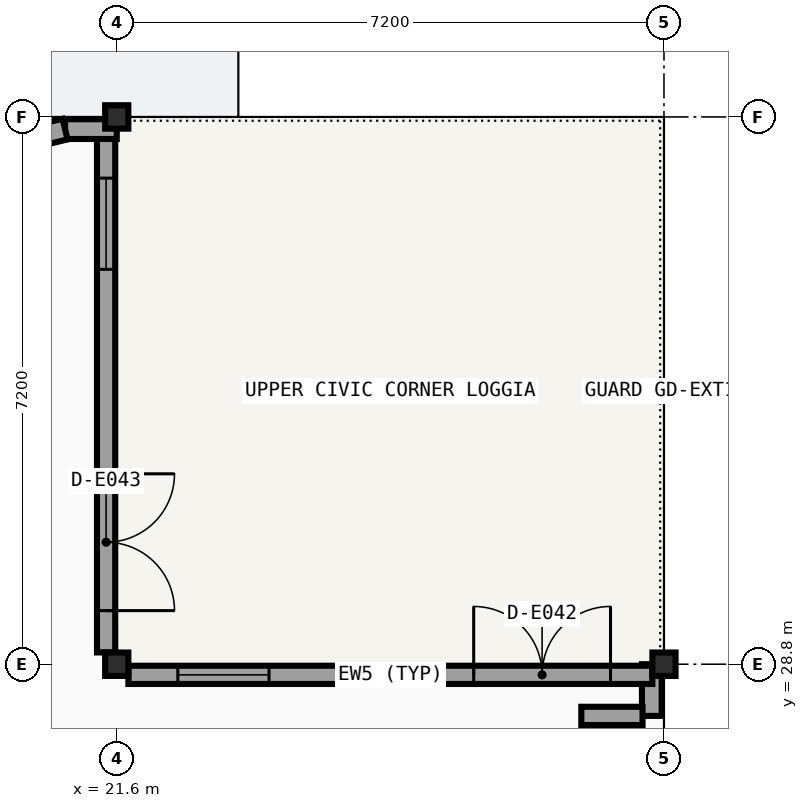
"""IFC4 building model, lengths in metres.
Left out: names, types, materials, properties, quantities, classifications, styles, units other than length and angle.
Written with IfcOpenShell. Run it as: python <this file> out.ifc"""

import sys

from ifc_helpers import new_model, si_unit, direction, frame, frame_2d, origin, origin_2d, place, context, subcontext, project, spatial, rectangle, i_section, extrude, element, fill, save


model = new_model("IFC4")
c1 = context("Model", 3, precision=1e-05, world=origin(), true_north=direction((0.0, 1.0)))
c2 = subcontext(c1, "Body", "Model", "MODEL_VIEW")
j1 = project(units=[si_unit("LENGTHUNIT", "METRE"), si_unit("PLANEANGLEUNIT", "RADIAN")], contexts=[c1])
p1 = place(None, origin())
s1 = spatial("IfcSite", under=j1, at=p1, CompositionType="ELEMENT")
p2 = place(p1, origin())
s2 = spatial("IfcBuilding", under=s1, at=p2, CompositionType="ELEMENT")
p3 = place(p2, frame((0.0, 0.0, 31.05)))
s3 = spatial("IfcBuildingStorey", under=s2, at=p3, CompositionType="ELEMENT", Elevation=31.05)
for number, where, z_axis, x_axis in (
    (1, (21.6, 28.8, 0.0), (0.0, 0.0, 1.0), (1.0, 0.0, 0.0)),
    (2, (21.6, 36.0, 0.0), (0.0, 0.0, 1.0), (1.0, 0.0, 0.0)),
    (3, (28.8, 28.8, 0.0), (0.0, 0.0, 1.0), (1.0, 0.0, 0.0)),
):
    element("IfcColumn", number, at=place(p3, frame(where, z_axis=z_axis, x_axis=x_axis)), inside=s3, PredefinedType="COLUMN", context=c2, shape_type="SweptSolid", body=[
        extrude(i_section(OverallWidth=0.305, OverallDepth=0.308, WebThickness=0.01, FlangeThickness=0.015, FilletRadius=0.015, at=origin_2d()), origin(), (0.0, 0.0, 1.0), 4.2),
    ])
p4 = place(p3, frame((28.64, 28.12, 0.0), z_axis=(0.0, 0.0, 1.0), x_axis=(0.0, 1.0, 0.0)))
e4 = element("IfcWall", 4, at=p4, inside=s3, PredefinedType="SOLIDWALL", context=c2, shape_type="SweptSolid", body=[
    extrude(rectangle(XDim=0.68, YDim=0.26, at=frame_2d((0.34, 0.0))), origin(), (0.0, 0.0, 1.0), 3.95),
])
p5 = place(p3, frame((28.64, 24.86, 0.0), z_axis=(0.0, 0.0, 1.0), x_axis=(-0.233460824675, 0.972366208453, 0.0)))
e5 = element("IfcWall", 5, at=p5, inside=s3, PredefinedType="SOLIDWALL", context=c2, shape_type="SweptSolid", body=[
    extrude(rectangle(XDim=3.258, YDim=0.28, at=frame_2d((1.629, 0.0))), origin(), (0.0, 0.0, 1.0), 3.95),
])
p6 = place(p5, frame((0.829, 0.0, 0.8)))
e6 = element("IfcOpeningElement", 6, at=p6, cuts=e5, PredefinedType="OPENING", context=c2, shape_type="SweptSolid", body=[
    extrude(rectangle(XDim=1.6, YDim=1.75, at=frame_2d((0.8, 0.875))), frame((0.0, 0.15, 0.0), z_axis=(0.0, -1.0, 0.0), x_axis=(1.0, 0.0, 0.0)), (0.0, 0.0, 1.0), 0.3),
])
p7 = place(p3, frame((27.712, 28.12, 0.0), z_axis=(0.0, 0.0, 1.0), x_axis=(1.0, 0.0, 0.0)))
e7 = element("IfcWall", 7, at=p7, inside=s3, PredefinedType="SOLIDWALL", context=c2, shape_type="SweptSolid", body=[
    extrude(rectangle(XDim=0.806, YDim=0.24, at=frame_2d((0.403, 0.0))), origin(), (0.0, 0.0, 1.0), 3.95),
])
p8 = place(p3, frame((28.646, 28.66, 0.0), z_axis=(0.0, 0.0, 1.0), x_axis=(-1.0, 0.0, 0.0)))
e8 = element("IfcWall", 8, at=p8, inside=s3, PredefinedType="SOLIDWALL", context=c2, shape_type="SweptSolid", body=[
    extrude(rectangle(XDim=6.893, YDim=0.24, at=frame_2d((3.447, 0.0))), origin(), (0.0, 0.0, 1.0), 3.95),
])
p9 = place(p8, frame((0.55, 0.0, 0.0)))
e9 = element("IfcOpeningElement", 9, at=p9, cuts=e8, PredefinedType="OPENING", context=c2, shape_type="SweptSolid", body=[
    extrude(rectangle(XDim=1.8, YDim=2.15, at=frame_2d((0.9, 1.075))), frame((0.0, 0.13, 0.0), z_axis=(0.0, -1.0, 0.0), x_axis=(1.0, 0.0, 0.0)), (0.0, 0.0, 1.0), 0.26),
])
p10 = place(p8, frame((5.043, 0.0, 0.85)))
e10 = element("IfcOpeningElement", 10, at=p10, cuts=e8, PredefinedType="OPENING", context=c2, shape_type="SweptSolid", body=[
    extrude(rectangle(XDim=1.2, YDim=1.95, at=frame_2d((0.6, 0.975))), frame((0.0, 0.13, 0.0), z_axis=(0.0, -1.0, 0.0), x_axis=(1.0, 0.0, 0.0)), (0.0, 0.0, 1.0), 0.26),
])
p11 = place(p3, frame((21.46, 28.955, 0.0), z_axis=(0.0, 0.0, 1.0), x_axis=(0.0, 1.0, 0.0)))
e11 = element("IfcWall", 11, at=p11, inside=s3, PredefinedType="SOLIDWALL", context=c2, shape_type="SweptSolid", body=[
    extrude(rectangle(XDim=6.89, YDim=0.24, at=frame_2d((3.445, 0.0))), origin(), (0.0, 0.0, 1.0), 3.95),
])
p12 = place(p11, frame((0.55, 0.0, 0.0)))
e12 = element("IfcOpeningElement", 12, at=p12, cuts=e11, PredefinedType="OPENING", context=c2, shape_type="SweptSolid", body=[
    extrude(rectangle(XDim=1.8, YDim=2.15, at=frame_2d((0.9, 1.075))), frame((0.0, 0.13, 0.0), z_axis=(0.0, -1.0, 0.0), x_axis=(1.0, 0.0, 0.0)), (0.0, 0.0, 1.0), 0.26),
])
p13 = place(p11, frame((5.04, 0.0, 0.85)))
e13 = element("IfcOpeningElement", 13, at=p13, cuts=e11, PredefinedType="OPENING", context=c2, shape_type="SweptSolid", body=[
    extrude(rectangle(XDim=1.2, YDim=1.95, at=frame_2d((0.6, 0.975))), frame((0.0, 0.13, 0.0), z_axis=(0.0, -1.0, 0.0), x_axis=(1.0, 0.0, 0.0)), (0.0, 0.0, 1.0), 0.26),
])
p14 = place(p3, frame((21.6, 35.84, 0.0), z_axis=(0.0, 0.0, 1.0), x_axis=(-1.0, 0.0, 0.0)))
e14 = element("IfcWall", 14, at=p14, inside=s3, PredefinedType="SOLIDWALL", context=c2, shape_type="SweptSolid", body=[
    extrude(rectangle(XDim=0.68, YDim=0.26, at=frame_2d((0.34, 0.0))), origin(), (0.0, 0.0, 1.0), 3.95),
])
p15 = place(p3, frame((20.92, 35.84, 0.0), z_axis=(0.0, 0.0, 1.0), x_axis=(-0.972366208453, -0.233460824675, 0.0)))
e15 = element("IfcWall", 15, at=p15, inside=s3, PredefinedType="SOLIDWALL", context=c2, shape_type="SweptSolid", body=[
    extrude(rectangle(XDim=3.258, YDim=0.28, at=frame_2d((1.629, 0.0))), origin(), (0.0, 0.0, 1.0), 3.95),
])
p16 = place(p15, frame((0.729, 0.0, 0.8)))
e16 = element("IfcOpeningElement", 16, at=p16, cuts=e15, PredefinedType="OPENING", context=c2, shape_type="SweptSolid", body=[
    extrude(rectangle(XDim=1.8, YDim=1.85, at=frame_2d((0.9, 0.925))), frame((0.0, 0.15, 0.0), z_axis=(0.0, -1.0, 0.0), x_axis=(1.0, 0.0, 0.0)), (0.0, 0.0, 1.0), 0.3),
])
p17 = place(p9, frame((1.8, 0.0, 0.0), z_axis=(0.0, 0.0, 1.0), x_axis=(-1.0, 0.0, 0.0)))
e17 = element("IfcDoor", 17, at=p17, inside=s3, OperationType="DOUBLE_DOOR_SINGLE_SWING", PredefinedType="DOOR", context=c2, shape_type="SweptSolid", body=[
    extrude(rectangle(XDim=1.8, YDim=2.15, at=frame_2d((0.9, 1.075))), frame((0.0, 0.025, 0.0), z_axis=(0.0, -1.0, 0.0), x_axis=(1.0, 0.0, 0.0)), (0.0, 0.0, 1.0), 0.05),
])
fill(e9, e17)
p18 = place(p10, origin())
e18 = element("IfcWindow", 18, at=p18, inside=s3, PartitioningType="SINGLE_PANEL", PredefinedType="WINDOW", context=c2, shape_type="SweptSolid", body=[
    extrude(rectangle(XDim=1.2, YDim=1.95, at=frame_2d((0.6, 0.975))), frame((0.0, 0.03, 0.0), z_axis=(0.0, -1.0, 0.0), x_axis=(1.0, 0.0, 0.0)), (0.0, 0.0, 1.0), 0.06),
])
fill(e10, e18)
p19 = place(p12, frame((1.8, 0.0, 0.0), z_axis=(0.0, 0.0, 1.0), x_axis=(-1.0, 0.0, 0.0)))
e19 = element("IfcDoor", 19, at=p19, inside=s3, OperationType="DOUBLE_DOOR_SINGLE_SWING", PredefinedType="DOOR", context=c2, shape_type="SweptSolid", body=[
    extrude(rectangle(XDim=1.8, YDim=2.15, at=frame_2d((0.9, 1.075))), frame((0.0, 0.025, 0.0), z_axis=(0.0, -1.0, 0.0), x_axis=(1.0, 0.0, 0.0)), (0.0, 0.0, 1.0), 0.05),
])
fill(e12, e19)
p20 = place(p13, origin())
e20 = element("IfcWindow", 20, at=p20, inside=s3, PartitioningType="SINGLE_PANEL", PredefinedType="WINDOW", context=c2, shape_type="SweptSolid", body=[
    extrude(rectangle(XDim=1.2, YDim=1.95, at=frame_2d((0.6, 0.975))), frame((0.0, 0.03, 0.0), z_axis=(0.0, -1.0, 0.0), x_axis=(1.0, 0.0, 0.0)), (0.0, 0.0, 1.0), 0.06),
])
fill(e13, e20)
save(model, sys.argv[1])
